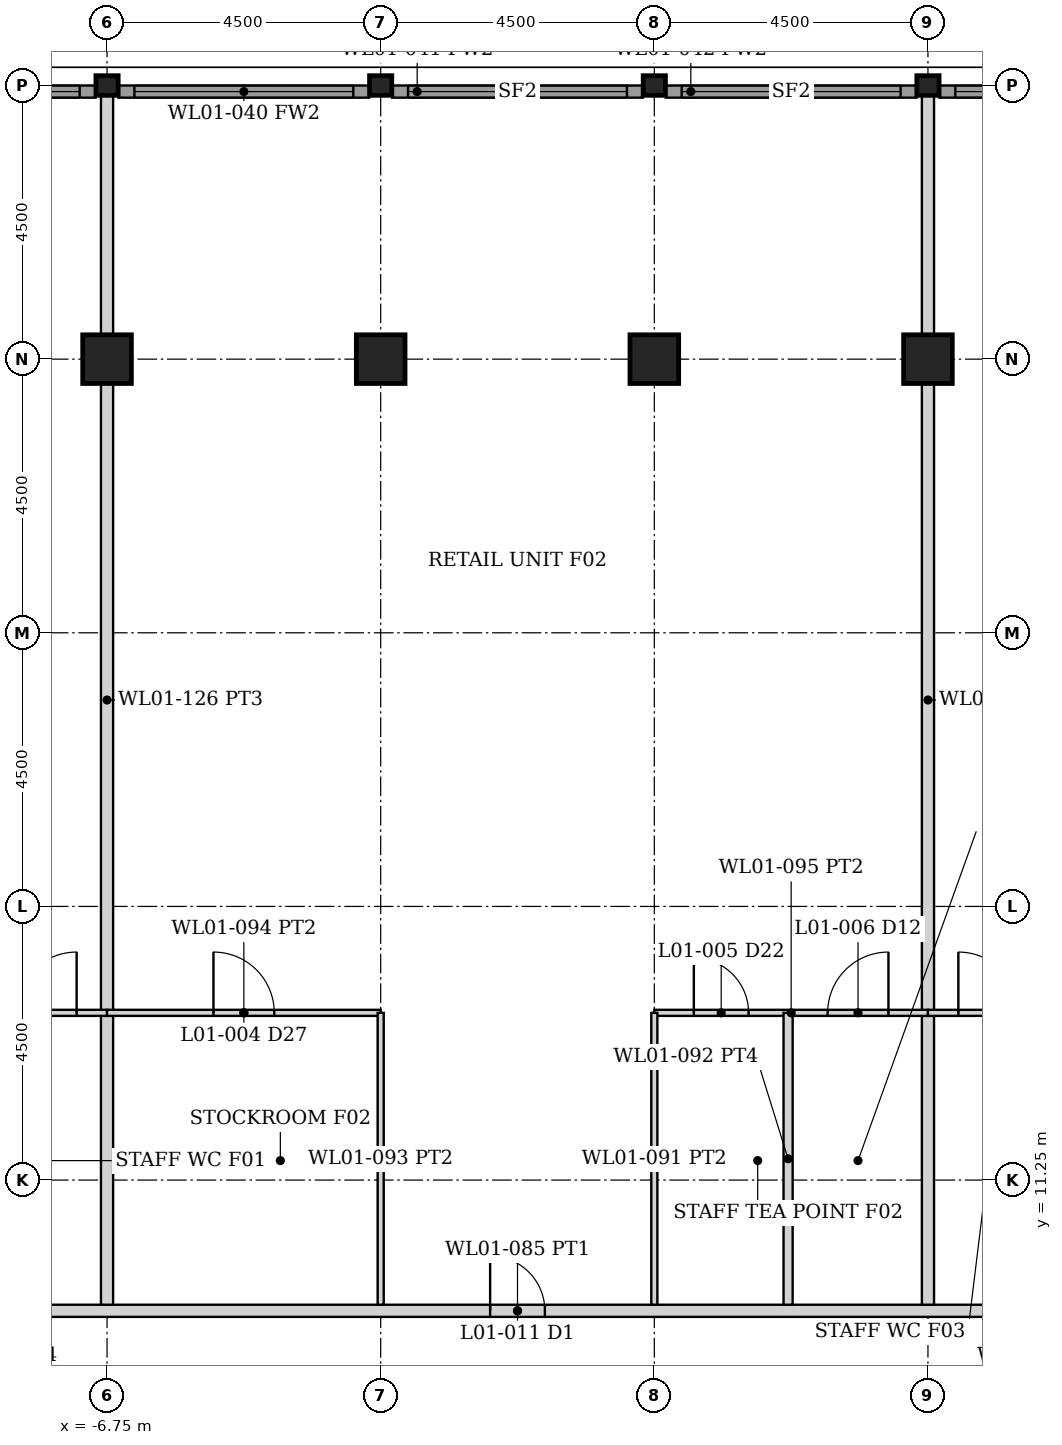
"""IFC4 building model, lengths in metres.
Left out: names, types, materials, properties, quantities, classifications, styles, units other than length and angle.
Written with IfcOpenShell. Run it as: python <this file> out.ifc"""

import sys

from ifc_helpers import new_model, si_unit, direction, frame, frame_2d, origin, origin_2d, place, context, subcontext, project, spatial, rectangle, hollow_rectangle, i_section, extrude, element, fill, save


model = new_model("IFC4")
c1 = context("Model", 3, precision=1e-05, world=origin(), true_north=direction((0.0, 1.0)))
c2 = subcontext(c1, "Body", "Model", "MODEL_VIEW")
j1 = project(units=[si_unit("LENGTHUNIT", "METRE"), si_unit("PLANEANGLEUNIT", "RADIAN")], contexts=[c1])
p1 = place(None, origin())
s1 = spatial("IfcSite", under=j1, at=p1, CompositionType="ELEMENT")
p2 = place(p1, origin())
s2 = spatial("IfcBuilding", under=s1, at=p2, CompositionType="ELEMENT")
p3 = place(p2, frame((0.0, 0.0, 6.0)))
s3 = spatial("IfcBuildingStorey", under=s2, at=p3, CompositionType="ELEMENT", Elevation=6.0)
for number, where, z_axis, x_axis in (
    (1, (-6.75, 24.75, 0.0), (0.0, 0.0, 1.0), (0.0, 1.0, 0.0)),
    (2, (-2.25, 24.75, 0.0), (0.0, 0.0, 1.0), (0.0, 1.0, 0.0)),
    (3, (2.25, 24.75, 0.0), (0.0, 0.0, 1.0), (0.0, 1.0, 0.0)),
    (4, (6.75, 24.75, 0.0), (0.0, 0.0, 1.0), (0.0, 1.0, 0.0)),
):
    element("IfcColumn", number, at=place(p3, frame(where, z_axis=z_axis, x_axis=x_axis)), inside=s3, PredefinedType="COLUMN", context=c2, shape_type="SweptSolid", body=[
        extrude(hollow_rectangle(XDim=0.8, YDim=0.8, WallThickness=0.08, at=origin_2d()), origin(), (0.0, 0.0, 1.0), 5.0),
    ])
for number, where, z_axis, x_axis in (
    (5, (-6.75, 29.25, 0.0), (0.0, 0.0, 1.0), (0.0, 1.0, 0.0)),
    (6, (-2.25, 29.25, 0.0), (0.0, 0.0, 1.0), (0.0, 1.0, 0.0)),
    (7, (2.25, 29.25, 0.0), (0.0, 0.0, 1.0), (0.0, 1.0, 0.0)),
    (8, (6.75, 29.25, 0.0), (0.0, 0.0, 1.0), (0.0, 1.0, 0.0)),
):
    element("IfcColumn", number, at=place(p3, frame(where, z_axis=z_axis, x_axis=x_axis)), inside=s3, PredefinedType="COLUMN", context=c2, shape_type="SweptSolid", body=[
        extrude(i_section(OverallWidth=0.322, OverallDepth=0.365, WebThickness=0.027, FlangeThickness=0.044, FilletRadius=0.015, at=origin_2d()), origin(), (0.0, 0.0, 1.0), 5.0),
    ])
p4 = place(p3, frame((-11.062, 29.15, 0.0), z_axis=(0.0, 0.0, 1.0), x_axis=(1.0, 0.0, 0.0)))
e9 = element("IfcWall", 9, at=p4, inside=s3, PredefinedType="SOLIDWALL", context=c2, shape_type="SweptSolid", body=[
    extrude(rectangle(XDim=4.125, YDim=0.2, at=frame_2d((2.062, 0.0))), origin(), (0.0, 0.0, 1.0), 4.133),
])
p5 = place(p4, frame((0.262, 0.0, 0.15)))
e10 = element("IfcOpeningElement", 10, at=p5, cuts=e9, PredefinedType="OPENING", context=c2, shape_type="SweptSolid", body=[
    extrude(rectangle(XDim=3.6, YDim=3.833, at=frame_2d((1.8, 1.917))), frame((0.0, 0.11, 0.0), z_axis=(0.0, -1.0, 0.0), x_axis=(1.0, 0.0, 0.0)), (0.0, 0.0, 1.0), 0.22),
])
p6 = place(p3, frame((-6.562, 29.15, 0.0), z_axis=(0.0, 0.0, 1.0), x_axis=(1.0, 0.0, 0.0)))
e11 = element("IfcWall", 11, at=p6, inside=s3, PredefinedType="SOLIDWALL", context=c2, shape_type="SweptSolid", body=[
    extrude(rectangle(XDim=4.125, YDim=0.2, at=frame_2d((2.062, 0.0))), origin(), (0.0, 0.0, 1.0), 4.133),
])
p7 = place(p6, frame((0.262, 0.0, 0.15)))
e12 = element("IfcOpeningElement", 12, at=p7, cuts=e11, PredefinedType="OPENING", context=c2, shape_type="SweptSolid", body=[
    extrude(rectangle(XDim=3.6, YDim=3.833, at=frame_2d((1.8, 1.917))), frame((0.0, 0.11, 0.0), z_axis=(0.0, -1.0, 0.0), x_axis=(1.0, 0.0, 0.0)), (0.0, 0.0, 1.0), 0.22),
])
p8 = place(p3, frame((-2.062, 29.15, 0.0), z_axis=(0.0, 0.0, 1.0), x_axis=(1.0, 0.0, 0.0)))
e13 = element("IfcWall", 13, at=p8, inside=s3, PredefinedType="SOLIDWALL", context=c2, shape_type="SweptSolid", body=[
    extrude(rectangle(XDim=4.125, YDim=0.2, at=frame_2d((2.062, 0.0))), origin(), (0.0, 0.0, 1.0), 4.133),
])
p9 = place(p8, frame((0.262, 0.0, 0.15)))
e14 = element("IfcOpeningElement", 14, at=p9, cuts=e13, PredefinedType="OPENING", context=c2, shape_type="SweptSolid", body=[
    extrude(rectangle(XDim=3.6, YDim=3.833, at=frame_2d((1.8, 1.917))), frame((0.0, 0.11, 0.0), z_axis=(0.0, -1.0, 0.0), x_axis=(1.0, 0.0, 0.0)), (0.0, 0.0, 1.0), 0.22),
])
p10 = place(p3, frame((2.438, 29.15, 0.0), z_axis=(0.0, 0.0, 1.0), x_axis=(1.0, 0.0, 0.0)))
e15 = element("IfcWall", 15, at=p10, inside=s3, PredefinedType="SOLIDWALL", context=c2, shape_type="SweptSolid", body=[
    extrude(rectangle(XDim=4.125, YDim=0.2, at=frame_2d((2.062, 0.0))), origin(), (0.0, 0.0, 1.0), 4.133),
])
p11 = place(p10, frame((0.262, 0.0, 0.15)))
e16 = element("IfcOpeningElement", 16, at=p11, cuts=e15, PredefinedType="OPENING", context=c2, shape_type="SweptSolid", body=[
    extrude(rectangle(XDim=3.6, YDim=3.833, at=frame_2d((1.8, 1.917))), frame((0.0, 0.11, 0.0), z_axis=(0.0, -1.0, 0.0), x_axis=(1.0, 0.0, 0.0)), (0.0, 0.0, 1.0), 0.22),
])
p12 = place(p3, frame((6.938, 29.15, 0.0), z_axis=(0.0, 0.0, 1.0), x_axis=(1.0, 0.0, 0.0)))
e17 = element("IfcWall", 17, at=p12, inside=s3, PredefinedType="SOLIDWALL", context=c2, shape_type="SweptSolid", body=[
    extrude(rectangle(XDim=4.125, YDim=0.2, at=frame_2d((2.062, 0.0))), origin(), (0.0, 0.0, 1.0), 4.133),
])
p13 = place(p12, frame((0.262, 0.0, 0.15)))
e18 = element("IfcOpeningElement", 18, at=p13, cuts=e17, PredefinedType="OPENING", context=c2, shape_type="SweptSolid", body=[
    extrude(rectangle(XDim=3.6, YDim=3.833, at=frame_2d((1.8, 1.917))), frame((0.0, 0.11, 0.0), z_axis=(0.0, -1.0, 0.0), x_axis=(1.0, 0.0, 0.0)), (0.0, 0.0, 1.0), 0.22),
])
p14 = place(p3, frame((-25.075, 9.1, 0.0), z_axis=(0.0, 0.0, 1.0), x_axis=(1.0, 0.0, 0.0)))
e19 = element("IfcWall", 19, at=p14, inside=s3, PredefinedType="PARTITIONING", context=c2, shape_type="SweptSolid", body=[
    extrude(rectangle(XDim=50.15, YDim=0.2, at=frame_2d((25.075, 0.0))), origin(), (0.0, 0.0, 1.0), 3.829),
])
p15 = place(p14, frame((6.85, 0.0, 0.0)))
e20 = element("IfcOpeningElement", 20, at=p15, cuts=e19, PredefinedType="OPENING", context=c2, shape_type="SweptSolid", body=[
    extrude(rectangle(XDim=0.9, YDim=2.1, at=frame_2d((0.45, 1.05))), frame((0.0, 0.11, 0.0), z_axis=(0.0, -1.0, 0.0), x_axis=(1.0, 0.0, 0.0)), (0.0, 0.0, 1.0), 0.22),
])
p16 = place(p14, frame((24.625, 0.0, 0.0)))
e21 = element("IfcOpeningElement", 21, at=p16, cuts=e19, PredefinedType="OPENING", context=c2, shape_type="SweptSolid", body=[
    extrude(rectangle(XDim=0.9, YDim=2.1, at=frame_2d((0.45, 1.05))), frame((0.0, 0.11, 0.0), z_axis=(0.0, -1.0, 0.0), x_axis=(1.0, 0.0, 0.0)), (0.0, 0.0, 1.0), 0.22),
])
p17 = place(p14, frame((42.4, 0.0, 0.0)))
e22 = element("IfcOpeningElement", 22, at=p17, cuts=e19, PredefinedType="OPENING", context=c2, shape_type="SweptSolid", body=[
    extrude(rectangle(XDim=0.9, YDim=2.1, at=frame_2d((0.45, 1.05))), frame((0.0, 0.11, 0.0), z_axis=(0.0, -1.0, 0.0), x_axis=(1.0, 0.0, 0.0)), (0.0, 0.0, 1.0), 0.22),
])
for number, where, z_axis, x_axis in (
    (23, (-6.75, 9.2, 0.0), (0.0, 0.0, 1.0), (0.0, 1.0, 0.0)),
    (24, (6.75, 9.2, 0.0), (0.0, 0.0, 1.0), (0.0, 1.0, 0.0)),
):
    element("IfcWall", number, at=place(p3, frame(where, z_axis=z_axis, x_axis=x_axis)), inside=s3, PredefinedType="PARTITIONING", context=c2, shape_type="SweptSolid", body=[
        extrude(rectangle(XDim=19.889, YDim=0.2, at=frame_2d((9.944, 0.0))), origin(), (0.0, 0.0, 1.0), 3.829),
    ])
p18 = place(p3, frame((-15.75, 14.0, 0.0), z_axis=(0.0, 0.0, 1.0), x_axis=(1.0, 0.0, 0.0)))
e25 = element("IfcWall", 25, at=p18, inside=s3, PredefinedType="PARTITIONING", context=c2, shape_type="SweptSolid", body=[
    extrude(rectangle(XDim=9.0, YDim=0.1, at=frame_2d((4.5, 0.0))), origin(), (0.0, 0.0, 1.0), 3.829),
])
p19 = place(p18, frame((1.95, 0.0, 0.0)))
e26 = element("IfcOpeningElement", 26, at=p19, cuts=e25, PredefinedType="OPENING", context=c2, shape_type="SweptSolid", body=[
    extrude(rectangle(XDim=0.9, YDim=2.1, at=frame_2d((0.45, 1.05))), frame((0.0, 0.06, 0.0), z_axis=(0.0, -1.0, 0.0), x_axis=(1.0, 0.0, 0.0)), (0.0, 0.0, 1.0), 0.12),
])
p20 = place(p18, frame((5.45, 0.0, 0.0)))
e27 = element("IfcOpeningElement", 27, at=p20, cuts=e25, PredefinedType="OPENING", context=c2, shape_type="SweptSolid", body=[
    extrude(rectangle(XDim=0.9, YDim=2.1, at=frame_2d((0.45, 1.05))), frame((0.0, 0.06, 0.0), z_axis=(0.0, -1.0, 0.0), x_axis=(1.0, 0.0, 0.0)), (0.0, 0.0, 1.0), 0.12),
])
p21 = place(p18, frame((7.5, 0.0, 0.0)))
e28 = element("IfcOpeningElement", 28, at=p21, cuts=e25, PredefinedType="OPENING", context=c2, shape_type="SweptSolid", body=[
    extrude(rectangle(XDim=1.0, YDim=2.1, at=frame_2d((0.5, 1.05))), frame((0.0, 0.06, 0.0), z_axis=(0.0, -1.0, 0.0), x_axis=(1.0, 0.0, 0.0)), (0.0, 0.0, 1.0), 0.12),
])
p22 = place(p3, frame((-6.75, 14.0, 0.0), z_axis=(0.0, 0.0, 1.0), x_axis=(1.0, 0.0, 0.0)))
e29 = element("IfcWall", 29, at=p22, inside=s3, PredefinedType="PARTITIONING", context=c2, shape_type="SweptSolid", body=[
    extrude(rectangle(XDim=4.5, YDim=0.1, at=frame_2d((2.25, 0.0))), origin(), (0.0, 0.0, 1.0), 3.829),
])
p23 = place(p22, frame((1.75, 0.0, 0.0)))
e30 = element("IfcOpeningElement", 30, at=p23, cuts=e29, PredefinedType="OPENING", context=c2, shape_type="SweptSolid", body=[
    extrude(rectangle(XDim=1.0, YDim=2.1, at=frame_2d((0.5, 1.05))), frame((0.0, 0.06, 0.0), z_axis=(0.0, -1.0, 0.0), x_axis=(1.0, 0.0, 0.0)), (0.0, 0.0, 1.0), 0.12),
])
p24 = place(p3, frame((2.25, 14.0, 0.0), z_axis=(0.0, 0.0, 1.0), x_axis=(1.0, 0.0, 0.0)))
e31 = element("IfcWall", 31, at=p24, inside=s3, PredefinedType="PARTITIONING", context=c2, shape_type="SweptSolid", body=[
    extrude(rectangle(XDim=4.5, YDim=0.1, at=frame_2d((2.25, 0.0))), origin(), (0.0, 0.0, 1.0), 3.829),
])
p25 = place(p24, frame((0.65, 0.0, 0.0)))
e32 = element("IfcOpeningElement", 32, at=p25, cuts=e31, PredefinedType="OPENING", context=c2, shape_type="SweptSolid", body=[
    extrude(rectangle(XDim=0.9, YDim=2.1, at=frame_2d((0.45, 1.05))), frame((0.0, 0.06, 0.0), z_axis=(0.0, -1.0, 0.0), x_axis=(1.0, 0.0, 0.0)), (0.0, 0.0, 1.0), 0.12),
])
p26 = place(p24, frame((2.85, 0.0, 0.0)))
e33 = element("IfcOpeningElement", 33, at=p26, cuts=e31, PredefinedType="OPENING", context=c2, shape_type="SweptSolid", body=[
    extrude(rectangle(XDim=1.0, YDim=2.1, at=frame_2d((0.5, 1.05))), frame((0.0, 0.06, 0.0), z_axis=(0.0, -1.0, 0.0), x_axis=(1.0, 0.0, 0.0)), (0.0, 0.0, 1.0), 0.12),
])
for number, where, z_axis, x_axis in (
    (34, (-2.25, 9.2, 0.0), (0.0, 0.0, 1.0), (0.0, 1.0, 0.0)),
    (35, (2.25, 9.2, 0.0), (0.0, 0.0, 1.0), (0.0, 1.0, 0.0)),
):
    element("IfcWall", number, at=place(p3, frame(where, z_axis=z_axis, x_axis=x_axis)), inside=s3, PredefinedType="PARTITIONING", context=c2, shape_type="SweptSolid", body=[
        extrude(rectangle(XDim=4.8, YDim=0.1, at=frame_2d((2.4, 0.0))), origin(), (0.0, 0.0, 1.0), 3.829),
    ])
p27 = place(p3, frame((4.45, 9.2, 0.0), z_axis=(0.0, 0.0, 1.0), x_axis=(0.0, 1.0, 0.0)))
e36 = element("IfcWall", 36, at=p27, inside=s3, PredefinedType="PARTITIONING", context=c2, shape_type="SweptSolid", body=[
    extrude(rectangle(XDim=4.8, YDim=0.15, at=frame_2d((2.4, 0.0))), origin(), (0.0, 0.0, 1.0), 3.829),
])
p28 = place(p3, frame((6.75, 14.0, 0.0), z_axis=(0.0, 0.0, 1.0), x_axis=(1.0, 0.0, 0.0)))
e37 = element("IfcWall", 37, at=p28, inside=s3, PredefinedType="PARTITIONING", context=c2, shape_type="SweptSolid", body=[
    extrude(rectangle(XDim=9.0, YDim=0.1, at=frame_2d((4.5, 0.0))), origin(), (0.0, 0.0, 1.0), 3.829),
])
p29 = place(p28, frame((6.15, 0.0, 0.0)))
e38 = element("IfcOpeningElement", 38, at=p29, cuts=e37, PredefinedType="OPENING", context=c2, shape_type="SweptSolid", body=[
    extrude(rectangle(XDim=0.9, YDim=2.1, at=frame_2d((0.45, 1.05))), frame((0.0, 0.06, 0.0), z_axis=(0.0, -1.0, 0.0), x_axis=(1.0, 0.0, 0.0)), (0.0, 0.0, 1.0), 0.12),
])
p30 = place(p28, frame((2.65, 0.0, 0.0)))
e39 = element("IfcOpeningElement", 39, at=p30, cuts=e37, PredefinedType="OPENING", context=c2, shape_type="SweptSolid", body=[
    extrude(rectangle(XDim=0.9, YDim=2.1, at=frame_2d((0.45, 1.05))), frame((0.0, 0.06, 0.0), z_axis=(0.0, -1.0, 0.0), x_axis=(1.0, 0.0, 0.0)), (0.0, 0.0, 1.0), 0.12),
])
p31 = place(p28, frame((0.5, 0.0, 0.0)))
e40 = element("IfcOpeningElement", 40, at=p31, cuts=e37, PredefinedType="OPENING", context=c2, shape_type="SweptSolid", body=[
    extrude(rectangle(XDim=1.0, YDim=2.1, at=frame_2d((0.5, 1.05))), frame((0.0, 0.06, 0.0), z_axis=(0.0, -1.0, 0.0), x_axis=(1.0, 0.0, 0.0)), (0.0, 0.0, 1.0), 0.12),
])
p32 = place(p5, origin())
e41 = element("IfcWindow", 41, at=p32, inside=s3, PartitioningType="SINGLE_PANEL", PredefinedType="WINDOW", context=c2, shape_type="SweptSolid", body=[
    extrude(rectangle(XDim=3.6, YDim=3.833, at=frame_2d((1.8, 1.917))), frame((0.0, 0.03, 0.0), z_axis=(0.0, -1.0, 0.0), x_axis=(1.0, 0.0, 0.0)), (0.0, 0.0, 1.0), 0.06),
])
fill(e10, e41)
p33 = place(p7, origin())
e42 = element("IfcWindow", 42, at=p33, inside=s3, PartitioningType="SINGLE_PANEL", PredefinedType="WINDOW", context=c2, shape_type="SweptSolid", body=[
    extrude(rectangle(XDim=3.6, YDim=3.833, at=frame_2d((1.8, 1.917))), frame((0.0, 0.03, 0.0), z_axis=(0.0, -1.0, 0.0), x_axis=(1.0, 0.0, 0.0)), (0.0, 0.0, 1.0), 0.06),
])
fill(e12, e42)
p34 = place(p9, origin())
e43 = element("IfcWindow", 43, at=p34, inside=s3, PartitioningType="SINGLE_PANEL", PredefinedType="WINDOW", context=c2, shape_type="SweptSolid", body=[
    extrude(rectangle(XDim=3.6, YDim=3.833, at=frame_2d((1.8, 1.917))), frame((0.0, 0.03, 0.0), z_axis=(0.0, -1.0, 0.0), x_axis=(1.0, 0.0, 0.0)), (0.0, 0.0, 1.0), 0.06),
])
fill(e14, e43)
p35 = place(p11, origin())
e44 = element("IfcWindow", 44, at=p35, inside=s3, PartitioningType="SINGLE_PANEL", PredefinedType="WINDOW", context=c2, shape_type="SweptSolid", body=[
    extrude(rectangle(XDim=3.6, YDim=3.833, at=frame_2d((1.8, 1.917))), frame((0.0, 0.03, 0.0), z_axis=(0.0, -1.0, 0.0), x_axis=(1.0, 0.0, 0.0)), (0.0, 0.0, 1.0), 0.06),
])
fill(e16, e44)
p36 = place(p13, origin())
e45 = element("IfcWindow", 45, at=p36, inside=s3, PartitioningType="SINGLE_PANEL", PredefinedType="WINDOW", context=c2, shape_type="SweptSolid", body=[
    extrude(rectangle(XDim=3.6, YDim=3.833, at=frame_2d((1.8, 1.917))), frame((0.0, 0.03, 0.0), z_axis=(0.0, -1.0, 0.0), x_axis=(1.0, 0.0, 0.0)), (0.0, 0.0, 1.0), 0.06),
])
fill(e18, e45)
p37 = place(p21, origin())
e46 = element("IfcDoor", 46, at=p37, inside=s3, OperationType="SINGLE_SWING_RIGHT", PredefinedType="DOOR", context=c2, shape_type="SweptSolid", body=[
    extrude(rectangle(XDim=1.0, YDim=2.1, at=frame_2d((0.5, 1.05))), frame((0.0, 0.025, 0.0), z_axis=(0.0, -1.0, 0.0), x_axis=(1.0, 0.0, 0.0)), (0.0, 0.0, 1.0), 0.05),
])
fill(e28, e46)
p38 = place(p23, origin())
e47 = element("IfcDoor", 47, at=p38, inside=s3, OperationType="SINGLE_SWING_LEFT", PredefinedType="DOOR", context=c2, shape_type="SweptSolid", body=[
    extrude(rectangle(XDim=1.0, YDim=2.1, at=frame_2d((0.5, 1.05))), frame((0.0, 0.025, 0.0), z_axis=(0.0, -1.0, 0.0), x_axis=(1.0, 0.0, 0.0)), (0.0, 0.0, 1.0), 0.05),
])
fill(e30, e47)
p39 = place(p25, origin())
e48 = element("IfcDoor", 48, at=p39, inside=s3, OperationType="SINGLE_SWING_LEFT", PredefinedType="DOOR", context=c2, shape_type="SweptSolid", body=[
    extrude(rectangle(XDim=0.9, YDim=2.1, at=frame_2d((0.45, 1.05))), frame((0.0, 0.025, 0.0), z_axis=(0.0, -1.0, 0.0), x_axis=(1.0, 0.0, 0.0)), (0.0, 0.0, 1.0), 0.05),
])
fill(e32, e48)
p40 = place(p26, origin())
e49 = element("IfcDoor", 49, at=p40, inside=s3, OperationType="SINGLE_SWING_RIGHT", PredefinedType="DOOR", context=c2, shape_type="SweptSolid", body=[
    extrude(rectangle(XDim=1.0, YDim=2.1, at=frame_2d((0.5, 1.05))), frame((0.0, 0.025, 0.0), z_axis=(0.0, -1.0, 0.0), x_axis=(1.0, 0.0, 0.0)), (0.0, 0.0, 1.0), 0.05),
])
fill(e33, e49)
p41 = place(p16, origin())
e50 = element("IfcDoor", 50, at=p41, inside=s3, OperationType="SINGLE_SWING_LEFT", PredefinedType="DOOR", context=c2, shape_type="SweptSolid", body=[
    extrude(rectangle(XDim=0.9, YDim=2.1, at=frame_2d((0.45, 1.05))), frame((0.0, 0.025, 0.0), z_axis=(0.0, -1.0, 0.0), x_axis=(1.0, 0.0, 0.0)), (0.0, 0.0, 1.0), 0.05),
])
fill(e21, e50)
p42 = place(p31, origin())
e51 = element("IfcDoor", 51, at=p42, inside=s3, OperationType="SINGLE_SWING_LEFT", PredefinedType="DOOR", context=c2, shape_type="SweptSolid", body=[
    extrude(rectangle(XDim=1.0, YDim=2.1, at=frame_2d((0.5, 1.05))), frame((0.0, 0.025, 0.0), z_axis=(0.0, -1.0, 0.0), x_axis=(1.0, 0.0, 0.0)), (0.0, 0.0, 1.0), 0.05),
])
fill(e40, e51)
save(model, sys.argv[1])
